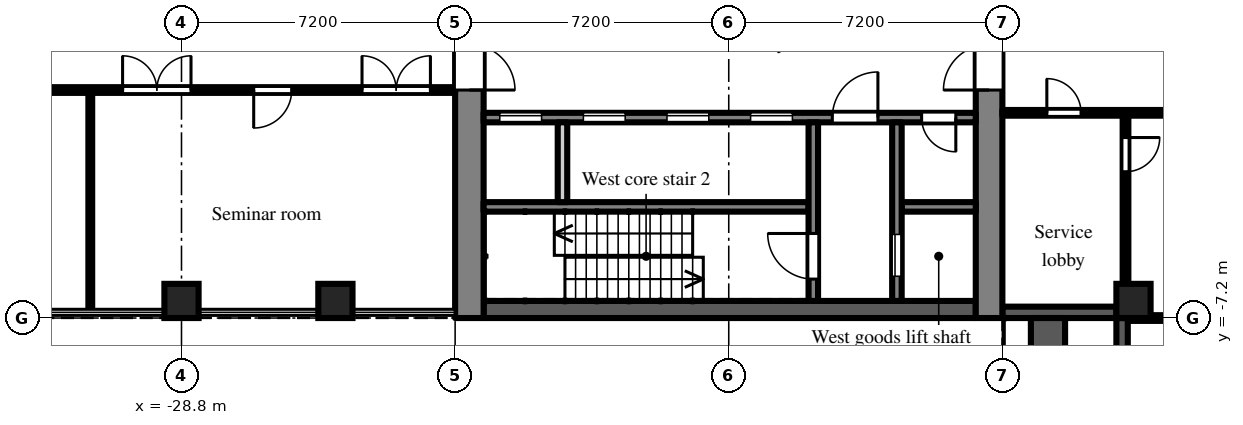
"""IFC4 building model, lengths in metres.
Left out: names, types, materials, properties, quantities, classifications, styles, units other than length and angle.
Written with IfcOpenShell. Run it as: python <this file> out.ifc"""

import sys

from ifc_helpers import new_model, si_unit, direction, frame, frame_2d, origin, origin_2d, place, context, subcontext, project, spatial, rectangle, extrude, element, fill, save


model = new_model("IFC4")
c1 = context("Model", 3, precision=1e-05, world=origin(), true_north=direction((0.0, 1.0)))
c2 = subcontext(c1, "Body", "Model", "MODEL_VIEW")
j1 = project(units=[si_unit("LENGTHUNIT", "METRE"), si_unit("PLANEANGLEUNIT", "RADIAN")], contexts=[c1])
p1 = place(None, origin())
s1 = spatial("IfcSite", under=j1, at=p1, CompositionType="ELEMENT")
p2 = place(p1, origin())
s2 = spatial("IfcBuilding", under=s1, at=p2, CompositionType="ELEMENT")
p3 = place(p2, frame((0.0, 0.0, 116.1)))
s3 = spatial("IfcBuildingStorey", under=s2, at=p3, CompositionType="ELEMENT", Elevation=116.1)
for number, where, z_axis, x_axis in (
    (1, (-28.8, -6.75, 0.0), (0.0, 0.0, 1.0), (1.0, 0.0, 0.0)),
    (2, (-24.75, -6.75, 0.0), (0.0, 0.0, 1.0), (1.0, 0.0, 0.0)),
    (3, (-3.75, -6.75, 0.0), (0.0, 0.0, 1.0), (1.0, 0.0, 0.0)),
):
    element("IfcColumn", number, at=place(p3, frame(where, z_axis=z_axis, x_axis=x_axis)), inside=s3, PredefinedType="COLUMN", context=c2, shape_type="SweptSolid", body=[
        extrude(rectangle(XDim=0.9, YDim=0.9, at=origin_2d()), origin(), (0.0, 0.0, 1.0), 4.2),
    ])
p4 = place(p3, frame((-7.2, -7.05, 0.0), z_axis=(0.0, 0.0, 1.0), x_axis=(1.0, 0.0, 0.0)))
e4 = element("IfcWall", 4, at=p4, inside=s3, PredefinedType="SOLIDWALL", context=c2, shape_type="SweptSolid", body=[
    extrude(rectangle(XDim=3.0, YDim=0.3, at=frame_2d((1.5, 0.0))), origin(), (0.0, 0.0, 1.0), 3.4),
])
p5 = place(p3, frame((-4.05, -7.2, 0.0), z_axis=(0.0, 0.0, 1.0), x_axis=(0.0, -1.0, 0.0)))
e5 = element("IfcWall", 5, at=p5, inside=s3, PredefinedType="SOLIDWALL", context=c2, shape_type="SweptSolid", body=[
    extrude(rectangle(XDim=7.2, YDim=0.3, at=frame_2d((3.6, 0.0))), origin(), (0.0, 0.0, 1.0), 3.4),
])
p6 = place(p5, frame((3.0, 0.0, 0.0)))
e6 = element("IfcOpeningElement", 6, at=p6, cuts=e5, PredefinedType="OPENING", context=c2, shape_type="SweptSolid", body=[
    extrude(rectangle(XDim=1.2, YDim=2.05, at=frame_2d((0.6, 1.025))), frame((0.0, 0.16, 0.0), z_axis=(0.0, -1.0, 0.0), x_axis=(1.0, 0.0, 0.0)), (0.0, 0.0, 1.0), 0.32),
])
p7 = place(p5, frame((0.9, 0.0, 0.2)))
e7 = element("IfcOpeningElement", 7, at=p7, cuts=e5, PredefinedType="OPENING", context=c2, shape_type="SweptSolid", body=[
    extrude(rectangle(XDim=1.8, YDim=1.85, at=frame_2d((0.9, 0.925))), frame((0.0, 0.16, 0.0), z_axis=(0.0, -1.0, 0.0), x_axis=(1.0, 0.0, 0.0)), (0.0, 0.0, 1.0), 0.32),
])
p8 = place(p5, frame((4.5, 0.0, 0.2)))
e8 = element("IfcOpeningElement", 8, at=p8, cuts=e5, PredefinedType="OPENING", context=c2, shape_type="SweptSolid", body=[
    extrude(rectangle(XDim=1.8, YDim=1.85, at=frame_2d((0.9, 0.925))), frame((0.0, 0.16, 0.0), z_axis=(0.0, -1.0, 0.0), x_axis=(1.0, 0.0, 0.0)), (0.0, 0.0, 1.0), 0.32),
])
p9 = place(p3, frame((-6.0, -14.4, 0.0), z_axis=(0.0, 0.0, 1.0), x_axis=(0.0, 1.0, 0.0)))
e9 = element("IfcWall", 9, at=p9, inside=s3, PredefinedType="PARAPET", context=c2, shape_type="SweptSolid", body=[
    extrude(rectangle(XDim=7.2, YDim=0.9, at=frame_2d((3.6, 0.0))), origin(), (0.0, 0.0, 1.0), 0.8),
])
p10 = place(p3, frame((-7.55, -7.2, 0.0), z_axis=(0.0, 0.0, 1.0), x_axis=(0.0, 1.0, 0.0)))
e10 = element("IfcWall", 10, at=p10, inside=s3, PredefinedType="SHEAR", context=c2, shape_type="SweptSolid", body=[
    extrude(rectangle(XDim=14.4, YDim=0.7, at=frame_2d((7.2, 0.0))), origin(), (0.0, 0.0, 1.0), 3.8),
])
p11 = place(p10, frame((6.0, 0.0, 0.0)))
e11 = element("IfcOpeningElement", 11, at=p11, cuts=e10, PredefinedType="OPENING", context=c2, shape_type="SweptSolid", body=[
    extrude(rectangle(XDim=2.4, YDim=2.2, at=frame_2d((1.2, 1.1))), frame((0.0, 0.36, 0.0), z_axis=(0.0, -1.0, 0.0), x_axis=(1.0, 0.0, 0.0)), (0.0, 0.0, 1.0), 0.72),
])
p12 = place(p3, frame((-21.225, -7.2, 0.0), z_axis=(0.0, 0.0, 1.0), x_axis=(0.0, 1.0, 0.0)))
e12 = element("IfcWall", 12, at=p12, inside=s3, PredefinedType="SHEAR", context=c2, shape_type="SweptSolid", body=[
    extrude(rectangle(XDim=14.4, YDim=0.75, at=frame_2d((7.2, 0.0))), origin(), (0.0, 0.0, 1.0), 3.8),
])
p13 = place(p12, frame((6.0, 0.0, 0.0)))
e13 = element("IfcOpeningElement", 13, at=p13, cuts=e12, PredefinedType="OPENING", context=c2, shape_type="SweptSolid", body=[
    extrude(rectangle(XDim=2.4, YDim=2.2, at=frame_2d((1.2, 1.1))), frame((0.0, 0.385, 0.0), z_axis=(0.0, -1.0, 0.0), x_axis=(1.0, 0.0, 0.0)), (0.0, 0.0, 1.0), 0.77),
])
p14 = place(p3, frame((-7.9, -6.975, 0.0), z_axis=(0.0, 0.0, 1.0), x_axis=(-1.0, 0.0, 0.0)))
e14 = element("IfcWall", 14, at=p14, inside=s3, PredefinedType="SHEAR", context=c2, shape_type="SweptSolid", body=[
    extrude(rectangle(XDim=12.95, YDim=0.45, at=frame_2d((6.475, 0.0))), origin(), (0.0, 0.0, 1.0), 3.8),
])
p15 = place(p3, frame((-7.9, -1.925, 0.0), z_axis=(0.0, 0.0, 1.0), x_axis=(-1.0, 0.0, 0.0)))
e15 = element("IfcWall", 15, at=p15, inside=s3, PredefinedType="SHEAR", context=c2, shape_type="SweptSolid", body=[
    extrude(rectangle(XDim=12.95, YDim=0.25, at=frame_2d((6.475, 0.0))), origin(), (0.0, 0.0, 1.0), 3.8),
])
p16 = place(p15, frame((4.825, 0.0, 0.0)))
e16 = element("IfcOpeningElement", 16, at=p16, cuts=e15, PredefinedType="OPENING", context=c2, shape_type="SweptSolid", body=[
    extrude(rectangle(XDim=1.1, YDim=2.1, at=frame_2d((0.55, 1.05))), frame((0.0, 0.135, 0.0), z_axis=(0.0, -1.0, 0.0), x_axis=(1.0, 0.0, 0.0)), (0.0, 0.0, 1.0), 0.27),
])
p17 = place(p15, frame((7.025, 0.0, 0.0)))
e17 = element("IfcOpeningElement", 17, at=p17, cuts=e15, PredefinedType="OPENING", context=c2, shape_type="SweptSolid", body=[
    extrude(rectangle(XDim=1.1, YDim=2.1, at=frame_2d((0.55, 1.05))), frame((0.0, 0.135, 0.0), z_axis=(0.0, -1.0, 0.0), x_axis=(1.0, 0.0, 0.0)), (0.0, 0.0, 1.0), 0.27),
])
p18 = place(p15, frame((9.225, 0.0, 0.0)))
e18 = element("IfcOpeningElement", 18, at=p18, cuts=e15, PredefinedType="OPENING", context=c2, shape_type="SweptSolid", body=[
    extrude(rectangle(XDim=1.1, YDim=2.1, at=frame_2d((0.55, 1.05))), frame((0.0, 0.135, 0.0), z_axis=(0.0, -1.0, 0.0), x_axis=(1.0, 0.0, 0.0)), (0.0, 0.0, 1.0), 0.27),
])
p19 = place(p15, frame((11.425, 0.0, 0.0)))
e19 = element("IfcOpeningElement", 19, at=p19, cuts=e15, PredefinedType="OPENING", context=c2, shape_type="SweptSolid", body=[
    extrude(rectangle(XDim=1.1, YDim=2.1, at=frame_2d((0.55, 1.05))), frame((0.0, 0.135, 0.0), z_axis=(0.0, -1.0, 0.0), x_axis=(1.0, 0.0, 0.0)), (0.0, 0.0, 1.0), 0.27),
])
p20 = place(p15, frame((0.525, 0.0, 0.0)))
e20 = element("IfcOpeningElement", 20, at=p20, cuts=e15, PredefinedType="OPENING", context=c2, shape_type="SweptSolid", body=[
    extrude(rectangle(XDim=0.9, YDim=2.1, at=frame_2d((0.45, 1.05))), frame((0.0, 0.135, 0.0), z_axis=(0.0, -1.0, 0.0), x_axis=(1.0, 0.0, 0.0)), (0.0, 0.0, 1.0), 0.27),
])
p21 = place(p15, frame((2.575, 0.0, 0.0)))
e21 = element("IfcOpeningElement", 21, at=p21, cuts=e15, PredefinedType="OPENING", context=c2, shape_type="SweptSolid", body=[
    extrude(rectangle(XDim=1.2, YDim=2.1, at=frame_2d((0.6, 1.05))), frame((0.0, 0.135, 0.0), z_axis=(0.0, -1.0, 0.0), x_axis=(1.0, 0.0, 0.0)), (0.0, 0.0, 1.0), 0.27),
])
p22 = place(p3, frame((-7.9, -4.275, 0.0), z_axis=(0.0, 0.0, 1.0), x_axis=(-1.0, 0.0, 0.0)))
e22 = element("IfcWall", 22, at=p22, inside=s3, PredefinedType="SHEAR", context=c2, shape_type="SweptSolid", body=[
    extrude(rectangle(XDim=1.95, YDim=0.25, at=frame_2d((0.975, 0.0))), origin(), (0.0, 0.0, 1.0), 3.8),
])
p23 = place(p3, frame((-12.3, -4.275, 0.0), z_axis=(0.0, 0.0, 1.0), x_axis=(-1.0, 0.0, 0.0)))
e23 = element("IfcWall", 23, at=p23, inside=s3, PredefinedType="SHEAR", context=c2, shape_type="SweptSolid", body=[
    extrude(rectangle(XDim=8.55, YDim=0.25, at=frame_2d((4.275, 0.0))), origin(), (0.0, 0.0, 1.0), 3.8),
])
p24 = place(p3, frame((-9.975, -2.05, 0.0), z_axis=(0.0, 0.0, 1.0), x_axis=(0.0, -1.0, 0.0)))
e24 = element("IfcWall", 24, at=p24, inside=s3, PredefinedType="SHEAR", context=c2, shape_type="SweptSolid", body=[
    extrude(rectangle(XDim=4.7, YDim=0.25, at=frame_2d((2.35, 0.0))), origin(), (0.0, 0.0, 1.0), 3.8),
])
p25 = place(p24, frame((2.95, 0.0, 0.0)))
e25 = element("IfcOpeningElement", 25, at=p25, cuts=e24, PredefinedType="OPENING", context=c2, shape_type="SweptSolid", body=[
    extrude(rectangle(XDim=1.1, YDim=2.1, at=frame_2d((0.55, 1.05))), frame((0.0, 0.135, 0.0), z_axis=(0.0, -1.0, 0.0), x_axis=(1.0, 0.0, 0.0)), (0.0, 0.0, 1.0), 0.27),
])
p26 = place(p3, frame((-12.175, -2.05, 0.0), z_axis=(0.0, 0.0, 1.0), x_axis=(0.0, -1.0, 0.0)))
e26 = element("IfcWall", 26, at=p26, inside=s3, PredefinedType="SHEAR", context=c2, shape_type="SweptSolid", body=[
    extrude(rectangle(XDim=4.7, YDim=0.25, at=frame_2d((2.35, 0.0))), origin(), (0.0, 0.0, 1.0), 3.8),
])
p27 = place(p26, frame((2.925, 0.0, 0.0)))
e27 = element("IfcOpeningElement", 27, at=p27, cuts=e26, PredefinedType="OPENING", context=c2, shape_type="SweptSolid", body=[
    extrude(rectangle(XDim=1.2, YDim=2.1, at=frame_2d((0.6, 1.05))), frame((0.0, 0.135, 0.0), z_axis=(0.0, -1.0, 0.0), x_axis=(1.0, 0.0, 0.0)), (0.0, 0.0, 1.0), 0.27),
])
p28 = place(p3, frame((-18.775, -2.05, 0.0), z_axis=(0.0, 0.0, 1.0), x_axis=(0.0, -1.0, 0.0)))
e28 = element("IfcWall", 28, at=p28, inside=s3, PredefinedType="PARTITIONING", context=c2, shape_type="SweptSolid", body=[
    extrude(rectangle(XDim=2.1, YDim=0.25, at=frame_2d((1.05, 0.0))), origin(), (0.0, 0.0, 1.0), 3.8),
])
p29 = place(p3, frame((-36.5, -1.2, 0.0), z_axis=(0.0, 0.0, 1.0), x_axis=(1.0, 0.0, 0.0)))
e29 = element("IfcWall", 29, at=p29, inside=s3, PredefinedType="PARTITIONING", context=c2, shape_type="SweptSolid", body=[
    extrude(rectangle(XDim=14.9, YDim=0.15, at=frame_2d((7.45, 0.0))), origin(), (0.0, 0.0, 1.0), 3.8),
])
p30 = place(p29, frame((6.15, 0.0, 0.0)))
e30 = element("IfcOpeningElement", 30, at=p30, cuts=e29, PredefinedType="OPENING", context=c2, shape_type="SweptSolid", body=[
    extrude(rectangle(XDim=1.8, YDim=2.1, at=frame_2d((0.9, 1.05))), frame((0.0, 0.085, 0.0), z_axis=(0.0, -1.0, 0.0), x_axis=(1.0, 0.0, 0.0)), (0.0, 0.0, 1.0), 0.17),
])
p31 = place(p29, frame((9.6, 0.0, 0.0)))
e31 = element("IfcOpeningElement", 31, at=p31, cuts=e29, PredefinedType="OPENING", context=c2, shape_type="SweptSolid", body=[
    extrude(rectangle(XDim=1.0, YDim=2.1, at=frame_2d((0.5, 1.05))), frame((0.0, 0.085, 0.0), z_axis=(0.0, -1.0, 0.0), x_axis=(1.0, 0.0, 0.0)), (0.0, 0.0, 1.0), 0.17),
])
p32 = place(p29, frame((12.45, 0.0, 0.0)))
e32 = element("IfcOpeningElement", 32, at=p32, cuts=e29, PredefinedType="OPENING", context=c2, shape_type="SweptSolid", body=[
    extrude(rectangle(XDim=1.8, YDim=2.1, at=frame_2d((0.9, 1.05))), frame((0.0, 0.085, 0.0), z_axis=(0.0, -1.0, 0.0), x_axis=(1.0, 0.0, 0.0)), (0.0, 0.0, 1.0), 0.17),
])
p33 = place(p29, frame((2.15, 0.0, 0.0)))
e33 = element("IfcOpeningElement", 33, at=p33, cuts=e29, PredefinedType="OPENING", context=c2, shape_type="SweptSolid", body=[
    extrude(rectangle(XDim=1.0, YDim=2.1, at=frame_2d((0.5, 1.05))), frame((0.0, 0.085, 0.0), z_axis=(0.0, -1.0, 0.0), x_axis=(1.0, 0.0, 0.0)), (0.0, 0.0, 1.0), 0.17),
])
p34 = place(p3, frame((-31.2, -7.02, 0.0), z_axis=(0.0, 0.0, 1.0), x_axis=(0.0, 1.0, 0.0)))
e34 = element("IfcWall", 34, at=p34, inside=s3, PredefinedType="PARTITIONING", context=c2, shape_type="SweptSolid", body=[
    extrude(rectangle(XDim=5.745, YDim=0.1, at=frame_2d((2.873, 0.0))), origin(), (0.0, 0.0, 1.0), 3.8),
])
p35 = place(p3, frame((-7.2, -1.8, 0.0), z_axis=(0.0, 0.0, 1.0), x_axis=(1.0, 0.0, 0.0)))
e35 = element("IfcWall", 35, at=p35, inside=s3, PredefinedType="PARTITIONING", context=c2, shape_type="SweptSolid", body=[
    extrude(rectangle(XDim=5.325, YDim=0.15, at=frame_2d((2.663, 0.0))), origin(), (0.0, 0.0, 1.0), 3.8),
])
p36 = place(p35, frame((1.17, 0.0, 0.0)))
e36 = element("IfcOpeningElement", 36, at=p36, cuts=e35, PredefinedType="OPENING", context=c2, shape_type="SweptSolid", body=[
    extrude(rectangle(XDim=0.9, YDim=2.1, at=frame_2d((0.45, 1.05))), frame((0.0, 0.085, 0.0), z_axis=(0.0, -1.0, 0.0), x_axis=(1.0, 0.0, 0.0)), (0.0, 0.0, 1.0), 0.17),
])
p37 = place(p3, frame((-3.96, -6.9, 0.0), z_axis=(0.0, 0.0, 1.0), x_axis=(0.0, 1.0, 0.0)))
e37 = element("IfcWall", 37, at=p37, inside=s3, PredefinedType="PARTITIONING", context=c2, shape_type="SweptSolid", body=[
    extrude(rectangle(XDim=5.025, YDim=0.15, at=frame_2d((2.512, 0.0))), origin(), (0.0, 0.0, 1.0), 3.8),
])
p38 = place(p37, frame((3.55, 0.0, 0.0)))
e38 = element("IfcOpeningElement", 38, at=p38, cuts=e37, PredefinedType="OPENING", context=c2, shape_type="SweptSolid", body=[
    extrude(rectangle(XDim=0.9, YDim=2.1, at=frame_2d((0.45, 1.05))), frame((0.0, 0.085, 0.0), z_axis=(0.0, -1.0, 0.0), x_axis=(1.0, 0.0, 0.0)), (0.0, 0.0, 1.0), 0.17),
])
p39 = place(p3, frame((-3.9, -7.2, 0.0), z_axis=(0.0, 0.0, 1.0), x_axis=(1.0, 0.0, 0.0)))
e39 = element("IfcWall", 39, at=p39, inside=s3, PredefinedType="PARTITIONING", context=c2, shape_type="SweptSolid", body=[
    extrude(rectangle(XDim=5.7, YDim=0.15, at=frame_2d((2.85, 0.0))), origin(), (0.0, 0.0, 1.0), 3.8),
])
p40 = place(p39, frame((3.0, 0.0, 0.0)))
e40 = element("IfcOpeningElement", 40, at=p40, cuts=e39, PredefinedType="OPENING", context=c2, shape_type="SweptSolid", body=[
    extrude(rectangle(XDim=1.8, YDim=2.1, at=frame_2d((0.9, 1.05))), frame((0.0, 0.085, 0.0), z_axis=(0.0, -1.0, 0.0), x_axis=(1.0, 0.0, 0.0)), (0.0, 0.0, 1.0), 0.17),
])
p41 = place(p16, origin())
e41 = element("IfcDoor", 41, at=p41, inside=s3, OperationType="SLIDING_TO_LEFT", PredefinedType="DOOR", context=c2, shape_type="SweptSolid", body=[
    extrude(rectangle(XDim=1.1, YDim=2.1, at=frame_2d((0.55, 1.05))), frame((0.0, 0.025, 0.0), z_axis=(0.0, -1.0, 0.0), x_axis=(1.0, 0.0, 0.0)), (0.0, 0.0, 1.0), 0.05),
])
fill(e16, e41)
p42 = place(p17, origin())
e42 = element("IfcDoor", 42, at=p42, inside=s3, OperationType="SLIDING_TO_LEFT", PredefinedType="DOOR", context=c2, shape_type="SweptSolid", body=[
    extrude(rectangle(XDim=1.1, YDim=2.1, at=frame_2d((0.55, 1.05))), frame((0.0, 0.025, 0.0), z_axis=(0.0, -1.0, 0.0), x_axis=(1.0, 0.0, 0.0)), (0.0, 0.0, 1.0), 0.05),
])
fill(e17, e42)
p43 = place(p18, origin())
e43 = element("IfcDoor", 43, at=p43, inside=s3, OperationType="SLIDING_TO_LEFT", PredefinedType="DOOR", context=c2, shape_type="SweptSolid", body=[
    extrude(rectangle(XDim=1.1, YDim=2.1, at=frame_2d((0.55, 1.05))), frame((0.0, 0.025, 0.0), z_axis=(0.0, -1.0, 0.0), x_axis=(1.0, 0.0, 0.0)), (0.0, 0.0, 1.0), 0.05),
])
fill(e18, e43)
p44 = place(p19, origin())
e44 = element("IfcDoor", 44, at=p44, inside=s3, OperationType="SLIDING_TO_LEFT", PredefinedType="DOOR", context=c2, shape_type="SweptSolid", body=[
    extrude(rectangle(XDim=1.1, YDim=2.1, at=frame_2d((0.55, 1.05))), frame((0.0, 0.025, 0.0), z_axis=(0.0, -1.0, 0.0), x_axis=(1.0, 0.0, 0.0)), (0.0, 0.0, 1.0), 0.05),
])
fill(e19, e44)
p45 = place(p25, origin())
e45 = element("IfcDoor", 45, at=p45, inside=s3, OperationType="SLIDING_TO_LEFT", PredefinedType="DOOR", context=c2, shape_type="SweptSolid", body=[
    extrude(rectangle(XDim=1.1, YDim=2.1, at=frame_2d((0.55, 1.05))), frame((0.0, 0.025, 0.0), z_axis=(0.0, -1.0, 0.0), x_axis=(1.0, 0.0, 0.0)), (0.0, 0.0, 1.0), 0.05),
])
fill(e25, e45)
p46 = place(p27, frame((1.2, 0.0, 0.0), z_axis=(0.0, 0.0, 1.0), x_axis=(-1.0, 0.0, 0.0)))
e46 = element("IfcDoor", 46, at=p46, inside=s3, OperationType="SINGLE_SWING_RIGHT", PredefinedType="DOOR", context=c2, shape_type="SweptSolid", body=[
    extrude(rectangle(XDim=1.2, YDim=2.1, at=frame_2d((0.6, 1.05))), frame((0.0, 0.025, 0.0), z_axis=(0.0, -1.0, 0.0), x_axis=(1.0, 0.0, 0.0)), (0.0, 0.0, 1.0), 0.05),
])
fill(e27, e46)
p47 = place(p20, origin())
e47 = element("IfcDoor", 47, at=p47, inside=s3, OperationType="SINGLE_SWING_LEFT", PredefinedType="DOOR", context=c2, shape_type="SweptSolid", body=[
    extrude(rectangle(XDim=0.9, YDim=2.1, at=frame_2d((0.45, 1.05))), frame((0.0, 0.025, 0.0), z_axis=(0.0, -1.0, 0.0), x_axis=(1.0, 0.0, 0.0)), (0.0, 0.0, 1.0), 0.05),
])
fill(e20, e47)
p48 = place(p21, frame((1.2, 0.0, 0.0), z_axis=(0.0, 0.0, 1.0), x_axis=(-1.0, 0.0, 0.0)))
e48 = element("IfcDoor", 48, at=p48, inside=s3, OperationType="SINGLE_SWING_RIGHT", PredefinedType="DOOR", context=c2, shape_type="SweptSolid", body=[
    extrude(rectangle(XDim=1.2, YDim=2.1, at=frame_2d((0.6, 1.05))), frame((0.0, 0.025, 0.0), z_axis=(0.0, -1.0, 0.0), x_axis=(1.0, 0.0, 0.0)), (0.0, 0.0, 1.0), 0.05),
])
fill(e21, e48)
p49 = place(p11, origin())
e49 = element("IfcDoor", 49, at=p49, inside=s3, OperationType="DOUBLE_DOOR_DOUBLE_SWING", PredefinedType="DOOR", context=c2, shape_type="SweptSolid", body=[
    extrude(rectangle(XDim=2.4, YDim=2.2, at=frame_2d((1.2, 1.1))), frame((0.0, 0.025, 0.0), z_axis=(0.0, -1.0, 0.0), x_axis=(1.0, 0.0, 0.0)), (0.0, 0.0, 1.0), 0.05),
])
fill(e11, e49)
p50 = place(p13, frame((2.4, 0.0, 0.0), z_axis=(0.0, 0.0, 1.0), x_axis=(-1.0, 0.0, 0.0)))
e50 = element("IfcDoor", 50, at=p50, inside=s3, OperationType="DOUBLE_DOOR_DOUBLE_SWING", PredefinedType="DOOR", context=c2, shape_type="SweptSolid", body=[
    extrude(rectangle(XDim=2.4, YDim=2.2, at=frame_2d((1.2, 1.1))), frame((0.0, 0.025, 0.0), z_axis=(0.0, -1.0, 0.0), x_axis=(1.0, 0.0, 0.0)), (0.0, 0.0, 1.0), 0.05),
])
fill(e13, e50)
p51 = place(p38, frame((0.9, 0.0, 0.0), z_axis=(0.0, 0.0, 1.0), x_axis=(-1.0, 0.0, 0.0)))
e51 = element("IfcDoor", 51, at=p51, inside=s3, OperationType="SINGLE_SWING_LEFT", PredefinedType="DOOR", context=c2, shape_type="SweptSolid", body=[
    extrude(rectangle(XDim=0.9, YDim=2.1, at=frame_2d((0.45, 1.05))), frame((0.0, 0.025, 0.0), z_axis=(0.0, -1.0, 0.0), x_axis=(1.0, 0.0, 0.0)), (0.0, 0.0, 1.0), 0.05),
])
fill(e38, e51)
p52 = place(p36, origin())
e52 = element("IfcDoor", 52, at=p52, inside=s3, OperationType="SINGLE_SWING_LEFT", PredefinedType="DOOR", context=c2, shape_type="SweptSolid", body=[
    extrude(rectangle(XDim=0.9, YDim=2.1, at=frame_2d((0.45, 1.05))), frame((0.0, 0.025, 0.0), z_axis=(0.0, -1.0, 0.0), x_axis=(1.0, 0.0, 0.0)), (0.0, 0.0, 1.0), 0.05),
])
fill(e36, e52)
p53 = place(p30, origin())
e53 = element("IfcDoor", 53, at=p53, inside=s3, OperationType="DOUBLE_DOOR_DOUBLE_SWING", PredefinedType="DOOR", context=c2, shape_type="SweptSolid", body=[
    extrude(rectangle(XDim=1.8, YDim=2.1, at=frame_2d((0.9, 1.05))), frame((0.0, 0.025, 0.0), z_axis=(0.0, -1.0, 0.0), x_axis=(1.0, 0.0, 0.0)), (0.0, 0.0, 1.0), 0.05),
])
fill(e30, e53)
p54 = place(p31, frame((1.0, 0.0, 0.0), z_axis=(0.0, 0.0, 1.0), x_axis=(-1.0, 0.0, 0.0)))
e54 = element("IfcDoor", 54, at=p54, inside=s3, OperationType="SINGLE_SWING_RIGHT", PredefinedType="DOOR", context=c2, shape_type="SweptSolid", body=[
    extrude(rectangle(XDim=1.0, YDim=2.1, at=frame_2d((0.5, 1.05))), frame((0.0, 0.025, 0.0), z_axis=(0.0, -1.0, 0.0), x_axis=(1.0, 0.0, 0.0)), (0.0, 0.0, 1.0), 0.05),
])
fill(e31, e54)
p55 = place(p32, origin())
e55 = element("IfcDoor", 55, at=p55, inside=s3, OperationType="DOUBLE_DOOR_DOUBLE_SWING", PredefinedType="DOOR", context=c2, shape_type="SweptSolid", body=[
    extrude(rectangle(XDim=1.8, YDim=2.1, at=frame_2d((0.9, 1.05))), frame((0.0, 0.025, 0.0), z_axis=(0.0, -1.0, 0.0), x_axis=(1.0, 0.0, 0.0)), (0.0, 0.0, 1.0), 0.05),
])
fill(e32, e55)
save(model, sys.argv[1])
